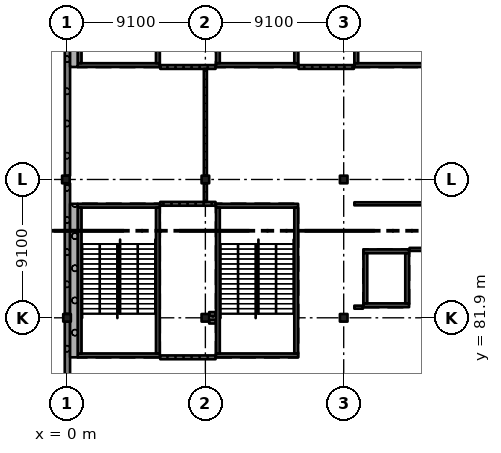
"""IFC4 building model, lengths in metres.
Left out: names, types, materials, properties, quantities, classifications, styles, units other than length and angle.
Written with IfcOpenShell. Run it as: python <this file> out.ifc"""

import sys

from ifc_helpers import new_model, si_unit, direction, frame, frame_2d, origin, origin_2d, place, context, subcontext, project, spatial, rectangle, extrude, element, fill, save


model = new_model("IFC4")
c1 = context("Model", 3, precision=1e-05, world=origin(), true_north=direction((0.0, 1.0)))
c2 = subcontext(c1, "Body", "Model", "MODEL_VIEW")
j1 = project(units=[si_unit("LENGTHUNIT", "METRE"), si_unit("PLANEANGLEUNIT", "RADIAN")], contexts=[c1])
p1 = place(None, origin())
s1 = spatial("IfcSite", under=j1, at=p1, CompositionType="ELEMENT")
p2 = place(p1, origin())
s2 = spatial("IfcBuilding", under=s1, at=p2, CompositionType="ELEMENT")
p3 = place(p2, frame((0.0, 0.0, 24.57)))
s3 = spatial("IfcBuildingStorey", under=s2, at=p3, CompositionType="ELEMENT", Elevation=24.57)
for number, where, z_axis, x_axis in (
    (1, (0.0, 81.9, 0.0), (0.0, 0.0, 1.0), (1.0, 0.0, 0.0)),
    (2, (-0.075, 91.0, 0.0), (0.0, 0.0, 1.0), (1.0, 0.0, 0.0)),
    (3, (9.1, 81.9, 0.0), (0.0, 0.0, 1.0), (1.0, 0.0, 0.0)),
    (4, (9.1, 91.0, 0.0), (0.0, 0.0, 1.0), (1.0, 0.0, 0.0)),
    (5, (18.2, 81.9, 0.0), (0.0, 0.0, 1.0), (1.0, 0.0, 0.0)),
    (6, (18.2, 91.0, 0.0), (0.0, 0.0, 1.0), (1.0, 0.0, 0.0)),
):
    element("IfcColumn", number, at=place(p3, frame(where, z_axis=z_axis, x_axis=x_axis)), inside=s3, PredefinedType="COLUMN", context=c2, shape_type="SweptSolid", body=[
        extrude(rectangle(XDim=0.5, YDim=0.5, at=origin_2d()), origin(), (0.0, 0.0, 1.0), 4.55),
    ])
p4 = place(p3, frame((22.5, 82.725, 0.0), z_axis=(0.0, 0.0, 1.0), x_axis=(-1.0, 0.0, 0.0)))
e7 = element("IfcWall", 7, at=p4, inside=s3, PredefinedType="SHEAR", context=c2, shape_type="SweptSolid", body=[
    extrude(rectangle(XDim=3.0, YDim=0.25, at=frame_2d((1.5, 0.0))), origin(), (0.0, 0.0, 1.0), 4.55),
])
p5 = place(p3, frame((22.5, 86.275, 0.0), z_axis=(0.0, 0.0, 1.0), x_axis=(-1.0, 0.0, 0.0)))
e8 = element("IfcWall", 8, at=p5, inside=s3, PredefinedType="SHEAR", context=c2, shape_type="SweptSolid", body=[
    extrude(rectangle(XDim=3.0, YDim=0.25, at=frame_2d((1.5, 0.0))), origin(), (0.0, 0.0, 1.0), 4.55),
])
p6 = place(p5, frame((0.95, 0.0, 0.0)))
e9 = element("IfcOpeningElement", 9, at=p6, cuts=e8, PredefinedType="OPENING", context=c2, shape_type="SweptSolid", body=[
    extrude(rectangle(XDim=1.1, YDim=2.1, at=frame_2d((0.55, 1.05))), frame((0.0, 0.135, 0.0), z_axis=(0.0, -1.0, 0.0), x_axis=(1.0, 0.0, 0.0)), (0.0, 0.0, 1.0), 0.27),
])
for number, where, z_axis, x_axis in (
    (10, (19.625, 86.15, 0.0), (0.0, 0.0, 1.0), (0.0, -1.0, 0.0)),
    (11, (22.375, 86.15, 0.0), (0.0, 0.0, 1.0), (0.0, -1.0, 0.0)),
):
    element("IfcWall", number, at=place(p3, frame(where, z_axis=z_axis, x_axis=x_axis)), inside=s3, PredefinedType="SHEAR", context=c2, shape_type="SweptSolid", body=[
        extrude(rectangle(XDim=3.3, YDim=0.25, at=frame_2d((1.65, 0.0))), origin(), (0.0, 0.0, 1.0), 4.55),
    ])
p7 = place(p3, frame((6.1, 98.525, 0.0), z_axis=(0.0, 0.0, 1.0), x_axis=(-1.0, 0.0, 0.0)))
e12 = element("IfcWall", 12, at=p7, inside=s3, PredefinedType="SHEAR", context=c2, shape_type="SweptSolid", body=[
    extrude(rectangle(XDim=5.4, YDim=0.25, at=frame_2d((2.7, 0.0))), origin(), (0.0, 0.0, 1.0), 4.55),
])
p8 = place(p7, frame((1.5, 0.0, 0.0)))
e13 = element("IfcOpeningElement", 13, at=p8, cuts=e12, PredefinedType="OPENING", context=c2, shape_type="SweptSolid", body=[
    extrude(rectangle(XDim=2.4, YDim=2.1, at=frame_2d((1.2, 1.05))), frame((0.0, 0.135, 0.0), z_axis=(0.0, -1.0, 0.0), x_axis=(1.0, 0.0, 0.0)), (0.0, 0.0, 1.0), 0.27),
])
for number, where, z_axis, x_axis in (
    (14, (0.825, 108.25, 0.0), (0.0, 0.0, 1.0), (0.0, -1.0, 0.0)),
    (15, (5.975, 108.25, 0.0), (0.0, 0.0, 1.0), (0.0, -1.0, 0.0)),
):
    element("IfcWall", number, at=place(p3, frame(where, z_axis=z_axis, x_axis=x_axis)), inside=s3, PredefinedType="SHEAR", context=c2, shape_type="SweptSolid", body=[
        extrude(rectangle(XDim=9.6, YDim=0.25, at=frame_2d((4.8, 0.0))), origin(), (0.0, 0.0, 1.0), 4.55),
    ])
p9 = place(p3, frame((15.2, 98.525, 0.0), z_axis=(0.0, 0.0, 1.0), x_axis=(-1.0, 0.0, 0.0)))
e16 = element("IfcWall", 16, at=p9, inside=s3, PredefinedType="SHEAR", context=c2, shape_type="SweptSolid", body=[
    extrude(rectangle(XDim=5.4, YDim=0.25, at=frame_2d((2.7, 0.0))), origin(), (0.0, 0.0, 1.0), 4.55),
])
p10 = place(p9, frame((1.5, 0.0, 0.0)))
e17 = element("IfcOpeningElement", 17, at=p10, cuts=e16, PredefinedType="OPENING", context=c2, shape_type="SweptSolid", body=[
    extrude(rectangle(XDim=2.4, YDim=2.1, at=frame_2d((1.2, 1.05))), frame((0.0, 0.135, 0.0), z_axis=(0.0, -1.0, 0.0), x_axis=(1.0, 0.0, 0.0)), (0.0, 0.0, 1.0), 0.27),
])
for number, where, z_axis, x_axis in (
    (18, (9.925, 108.25, 0.0), (0.0, 0.0, 1.0), (0.0, -1.0, 0.0)),
    (19, (15.075, 108.25, 0.0), (0.0, 0.0, 1.0), (0.0, -1.0, 0.0)),
):
    element("IfcWall", number, at=place(p3, frame(where, z_axis=z_axis, x_axis=x_axis)), inside=s3, PredefinedType="SHEAR", context=c2, shape_type="SweptSolid", body=[
        extrude(rectangle(XDim=9.6, YDim=0.25, at=frame_2d((4.8, 0.0))), origin(), (0.0, 0.0, 1.0), 4.55),
    ])
p11 = place(p3, frame((24.3, 98.525, 0.0), z_axis=(0.0, 0.0, 1.0), x_axis=(-1.0, 0.0, 0.0)))
e20 = element("IfcWall", 20, at=p11, inside=s3, PredefinedType="SHEAR", context=c2, shape_type="SweptSolid", body=[
    extrude(rectangle(XDim=5.4, YDim=0.25, at=frame_2d((2.7, 0.0))), origin(), (0.0, 0.0, 1.0), 4.55),
])
p12 = place(p11, frame((1.5, 0.0, 0.0)))
e21 = element("IfcOpeningElement", 21, at=p12, cuts=e20, PredefinedType="OPENING", context=c2, shape_type="SweptSolid", body=[
    extrude(rectangle(XDim=2.4, YDim=2.1, at=frame_2d((1.2, 1.05))), frame((0.0, 0.135, 0.0), z_axis=(0.0, -1.0, 0.0), x_axis=(1.0, 0.0, 0.0)), (0.0, 0.0, 1.0), 0.27),
])
p13 = place(p3, frame((19.025, 108.25, 0.0), z_axis=(0.0, 0.0, 1.0), x_axis=(0.0, -1.0, 0.0)))
e22 = element("IfcWall", 22, at=p13, inside=s3, PredefinedType="SHEAR", context=c2, shape_type="SweptSolid", body=[
    extrude(rectangle(XDim=9.6, YDim=0.25, at=frame_2d((4.8, 0.0))), origin(), (0.0, 0.0, 1.0), 4.55),
])
p14 = place(p3, frame((6.1, 79.425, 0.0), z_axis=(0.0, 0.0, 1.0), x_axis=(-1.0, 0.0, 0.0)))
e23 = element("IfcWall", 23, at=p14, inside=s3, PredefinedType="SHEAR", context=c2, shape_type="SweptSolid", body=[
    extrude(rectangle(XDim=5.4, YDim=0.25, at=frame_2d((2.7, 0.0))), origin(), (0.0, 0.0, 1.0), 4.55),
])
p15 = place(p3, frame((6.1, 89.275, 0.0), z_axis=(0.0, 0.0, 1.0), x_axis=(-1.0, 0.0, 0.0)))
e24 = element("IfcWall", 24, at=p15, inside=s3, PredefinedType="SHEAR", context=c2, shape_type="SweptSolid", body=[
    extrude(rectangle(XDim=5.4, YDim=0.25, at=frame_2d((2.7, 0.0))), origin(), (0.0, 0.0, 1.0), 4.55),
])
p16 = place(p15, frame((1.5, 0.0, 0.0)))
e25 = element("IfcOpeningElement", 25, at=p16, cuts=e24, PredefinedType="OPENING", context=c2, shape_type="SweptSolid", body=[
    extrude(rectangle(XDim=2.4, YDim=2.1, at=frame_2d((1.2, 1.05))), frame((0.0, 0.135, 0.0), z_axis=(0.0, -1.0, 0.0), x_axis=(1.0, 0.0, 0.0)), (0.0, 0.0, 1.0), 0.27),
])
for number, where, z_axis, x_axis in (
    (26, (0.825, 89.15, 0.0), (0.0, 0.0, 1.0), (0.0, -1.0, 0.0)),
    (27, (5.975, 89.15, 0.0), (0.0, 0.0, 1.0), (0.0, -1.0, 0.0)),
):
    element("IfcWall", number, at=place(p3, frame(where, z_axis=z_axis, x_axis=x_axis)), inside=s3, PredefinedType="SHEAR", context=c2, shape_type="SweptSolid", body=[
        extrude(rectangle(XDim=9.6, YDim=0.25, at=frame_2d((4.8, 0.0))), origin(), (0.0, 0.0, 1.0), 4.55),
    ])
p17 = place(p3, frame((15.2, 79.425, 0.0), z_axis=(0.0, 0.0, 1.0), x_axis=(-1.0, 0.0, 0.0)))
e28 = element("IfcWall", 28, at=p17, inside=s3, PredefinedType="SHEAR", context=c2, shape_type="SweptSolid", body=[
    extrude(rectangle(XDim=5.4, YDim=0.25, at=frame_2d((2.7, 0.0))), origin(), (0.0, 0.0, 1.0), 4.55),
])
p18 = place(p3, frame((15.2, 89.275, 0.0), z_axis=(0.0, 0.0, 1.0), x_axis=(-1.0, 0.0, 0.0)))
e29 = element("IfcWall", 29, at=p18, inside=s3, PredefinedType="SHEAR", context=c2, shape_type="SweptSolid", body=[
    extrude(rectangle(XDim=5.4, YDim=0.25, at=frame_2d((2.7, 0.0))), origin(), (0.0, 0.0, 1.0), 4.55),
])
p19 = place(p18, frame((1.5, 0.0, 0.0)))
e30 = element("IfcOpeningElement", 30, at=p19, cuts=e29, PredefinedType="OPENING", context=c2, shape_type="SweptSolid", body=[
    extrude(rectangle(XDim=2.4, YDim=2.1, at=frame_2d((1.2, 1.05))), frame((0.0, 0.135, 0.0), z_axis=(0.0, -1.0, 0.0), x_axis=(1.0, 0.0, 0.0)), (0.0, 0.0, 1.0), 0.27),
])
for number, where, z_axis, x_axis in (
    (31, (9.925, 89.15, 0.0), (0.0, 0.0, 1.0), (0.0, -1.0, 0.0)),
    (32, (15.075, 89.15, 0.0), (0.0, 0.0, 1.0), (0.0, -1.0, 0.0)),
):
    element("IfcWall", number, at=place(p3, frame(where, z_axis=z_axis, x_axis=x_axis)), inside=s3, PredefinedType="SHEAR", context=c2, shape_type="SweptSolid", body=[
        extrude(rectangle(XDim=9.6, YDim=0.25, at=frame_2d((4.8, 0.0))), origin(), (0.0, 0.0, 1.0), 4.55),
    ])
for number, where, z_axis, x_axis in (
    (33, (0.025, 99.85, 0.0), (0.0, 0.0, 1.0), (0.0, -1.0, 0.0)),
    (34, (0.025, 90.75, 0.0), (0.0, 0.0, 1.0), (0.0, -1.0, 0.0)),
):
    element("IfcWall", number, at=place(p3, frame(where, z_axis=z_axis, x_axis=x_axis)), inside=s3, PredefinedType="SOLIDWALL", context=c2, shape_type="SweptSolid", body=[
        extrude(rectangle(XDim=8.6, YDim=0.35, at=frame_2d((4.3, 0.0))), origin(), (0.0, 0.0, 1.0), 3.6),
    ])
p20 = place(p3, frame((0.025, 81.65, 0.0), z_axis=(0.0, 0.0, 1.0), x_axis=(0.0, -1.0, 0.0)))
e35 = element("IfcWall", 35, at=p20, inside=s3, PredefinedType="SOLIDWALL", context=c2, shape_type="SweptSolid", body=[
    extrude(rectangle(XDim=8.6, YDim=0.35, at=frame_2d((4.3, 0.0))), origin(), (0.0, 0.0, 1.0), 3.6),
])
p21 = place(p3, frame((0.45, 98.4, 0.0), z_axis=(0.0, 0.0, 1.0), x_axis=(0.0, 1.0, 0.0)))
e36 = element("IfcWall", 36, at=p21, inside=s3, PredefinedType="SOLIDWALL", context=c2, shape_type="SweptSolid", body=[
    extrude(rectangle(XDim=10.1, YDim=0.5, at=frame_2d((5.05, 0.0))), origin(), (0.0, 0.0, 1.0), 4.35),
])
p22 = place(p3, frame((0.45, 79.3, 0.0), z_axis=(0.0, 0.0, 1.0), x_axis=(0.0, 1.0, 0.0)))
e37 = element("IfcWall", 37, at=p22, inside=s3, PredefinedType="SOLIDWALL", context=c2, shape_type="SweptSolid", body=[
    extrude(rectangle(XDim=10.1, YDim=0.5, at=frame_2d((5.05, 0.0))), origin(), (0.0, 0.0, 1.0), 4.35),
])
p23 = place(p3, frame((6.13, 98.4, 0.0), z_axis=(0.0, 0.0, 1.0), x_axis=(1.0, 0.0, 0.0)))
e38 = element("IfcWall", 38, at=p23, inside=s3, PredefinedType="SOLIDWALL", context=c2, shape_type="SweptSolid", body=[
    extrude(rectangle(XDim=3.64, YDim=0.25, at=frame_2d((1.82, 0.0))), origin(), (0.0, 0.0, 1.0), 4.35),
])
p24 = place(p23, frame((0.95, 0.0, 0.0)))
e39 = element("IfcOpeningElement", 39, at=p24, cuts=e38, PredefinedType="OPENING", context=c2, shape_type="SweptSolid", body=[
    extrude(rectangle(XDim=1.0, YDim=2.1, at=frame_2d((0.5, 1.05))), frame((0.0, 0.135, 0.0), z_axis=(0.0, -1.0, 0.0), x_axis=(1.0, 0.0, 0.0)), (0.0, 0.0, 1.0), 0.27),
])
p25 = place(p3, frame((6.13, 89.4, 0.0), z_axis=(0.0, 0.0, 1.0), x_axis=(1.0, 0.0, 0.0)))
e40 = element("IfcWall", 40, at=p25, inside=s3, PredefinedType="SOLIDWALL", context=c2, shape_type="SweptSolid", body=[
    extrude(rectangle(XDim=3.64, YDim=0.25, at=frame_2d((1.82, 0.0))), origin(), (0.0, 0.0, 1.0), 4.35),
])
p26 = place(p25, frame((1.02, 0.0, 0.0)))
e41 = element("IfcOpeningElement", 41, at=p26, cuts=e40, PredefinedType="OPENING", context=c2, shape_type="SweptSolid", body=[
    extrude(rectangle(XDim=1.0, YDim=2.1, at=frame_2d((0.5, 1.05))), frame((0.0, 0.135, 0.0), z_axis=(0.0, -1.0, 0.0), x_axis=(1.0, 0.0, 0.0)), (0.0, 0.0, 1.0), 0.27),
])
p27 = place(p3, frame((9.1, 90.75, 0.0), z_axis=(0.0, 0.0, 1.0), x_axis=(0.0, -1.0, 0.0)))
e42 = element("IfcWall", 42, at=p27, inside=s3, PredefinedType="PARTITIONING", context=c2, shape_type="SweptSolid", body=[
    extrude(rectangle(XDim=1.225, YDim=0.2, at=frame_2d((0.613, 0.0))), origin(), (0.0, 0.0, 1.0), 3.6),
])
p28 = place(p3, frame((9.1, 98.275, 0.0), z_axis=(0.0, 0.0, 1.0), x_axis=(0.0, -1.0, 0.0)))
e43 = element("IfcWall", 43, at=p28, inside=s3, PredefinedType="PARTITIONING", context=c2, shape_type="SweptSolid", body=[
    extrude(rectangle(XDim=7.025, YDim=0.2, at=frame_2d((3.512, 0.0))), origin(), (0.0, 0.0, 1.0), 3.6),
])
p29 = place(p28, frame((0.85, 0.0, 0.0)))
e44 = element("IfcOpeningElement", 44, at=p29, cuts=e43, PredefinedType="OPENING", context=c2, shape_type="SweptSolid", body=[
    extrude(rectangle(XDim=1.8, YDim=2.4, at=frame_2d((0.9, 1.2))), frame((0.0, 0.11, 0.0), z_axis=(0.0, -1.0, 0.0), x_axis=(1.0, 0.0, 0.0)), (0.0, 0.0, 1.0), 0.22),
])
p30 = place(p28, frame((4.35, 0.0, 0.0)))
e45 = element("IfcOpeningElement", 45, at=p30, cuts=e43, PredefinedType="OPENING", context=c2, shape_type="SweptSolid", body=[
    extrude(rectangle(XDim=1.8, YDim=2.4, at=frame_2d((0.9, 1.2))), frame((0.0, 0.11, 0.0), z_axis=(0.0, -1.0, 0.0), x_axis=(1.0, 0.0, 0.0)), (0.0, 0.0, 1.0), 0.22),
])
p31 = place(p3, frame((9.35, 81.65, 0.0), z_axis=(0.0, 0.0, 1.0), x_axis=(1.0, 0.0, 0.0)))
e46 = element("IfcWall", 46, at=p31, inside=s3, PredefinedType="SOLIDWALL", context=c2, shape_type="SweptSolid", body=[
    extrude(rectangle(XDim=0.42, YDim=0.25, at=frame_2d((0.21, 0.0))), origin(), (0.0, 0.0, 1.0), 4.35),
])
p32 = place(p3, frame((9.77, 79.3, 0.0), z_axis=(0.0, 0.0, 1.0), x_axis=(-1.0, 0.0, 0.0)))
e47 = element("IfcWall", 47, at=p32, inside=s3, PredefinedType="SOLIDWALL", context=c2, shape_type="SweptSolid", body=[
    extrude(rectangle(XDim=3.64, YDim=0.25, at=frame_2d((1.82, 0.0))), origin(), (0.0, 0.0, 1.0), 4.35),
])
p33 = place(p3, frame((9.77, 82.15, 0.0), z_axis=(0.0, 0.0, 1.0), x_axis=(-1.0, 0.0, 0.0)))
e48 = element("IfcWall", 48, at=p33, inside=s3, PredefinedType="SOLIDWALL", context=c2, shape_type="SweptSolid", body=[
    extrude(rectangle(XDim=0.42, YDim=0.25, at=frame_2d((0.21, 0.0))), origin(), (0.0, 0.0, 1.0), 4.35),
])
p34 = place(p3, frame((15.23, 98.4, 0.0), z_axis=(0.0, 0.0, 1.0), x_axis=(1.0, 0.0, 0.0)))
e49 = element("IfcWall", 49, at=p34, inside=s3, PredefinedType="SOLIDWALL", context=c2, shape_type="SweptSolid", body=[
    extrude(rectangle(XDim=3.64, YDim=0.25, at=frame_2d((1.82, 0.0))), origin(), (0.0, 0.0, 1.0), 4.35),
])
p35 = place(p34, frame((1.45, 0.0, 0.0)))
e50 = element("IfcOpeningElement", 50, at=p35, cuts=e49, PredefinedType="OPENING", context=c2, shape_type="SweptSolid", body=[
    extrude(rectangle(XDim=0.8, YDim=2.1, at=frame_2d((0.4, 1.05))), frame((0.0, 0.135, 0.0), z_axis=(0.0, -1.0, 0.0), x_axis=(1.0, 0.0, 0.0)), (0.0, 0.0, 1.0), 0.27),
])
p36 = place(p3, frame((19.47, 82.6, 0.0), z_axis=(0.0, 0.0, 1.0), x_axis=(-1.0, 0.0, 0.0)))
e51 = element("IfcWall", 51, at=p36, inside=s3, PredefinedType="PARTITIONING", context=c2, shape_type="SweptSolid", body=[
    extrude(rectangle(XDim=0.57, YDim=0.2, at=frame_2d((0.285, 0.0))), origin(), (0.0, 0.0, 1.0), 4.35),
])
p37 = place(p3, frame((24.238, 86.4, 0.0), z_axis=(0.0, 0.0, 1.0), x_axis=(-1.0, 0.0, 0.0)))
e52 = element("IfcWall", 52, at=p37, inside=s3, PredefinedType="PARTITIONING", context=c2, shape_type="SweptSolid", body=[
    extrude(rectangle(XDim=1.708, YDim=0.2, at=frame_2d((0.854, 0.0))), origin(), (0.0, 0.0, 1.0), 4.35),
])
p38 = place(p3, frame((24.3, 89.4, 0.0), z_axis=(0.0, 0.0, 1.0), x_axis=(-1.0, 0.0, 0.0)))
e53 = element("IfcWall", 53, at=p38, inside=s3, PredefinedType="PARTITIONING", context=c2, shape_type="SweptSolid", body=[
    extrude(rectangle(XDim=5.4, YDim=0.2, at=frame_2d((2.7, 0.0))), origin(), (0.0, 0.0, 1.0), 4.35),
])
p39 = place(p38, frame((1.85, 0.0, 0.0)))
e54 = element("IfcOpeningElement", 54, at=p39, cuts=e53, PredefinedType="OPENING", context=c2, shape_type="SweptSolid", body=[
    extrude(rectangle(XDim=1.8, YDim=2.4, at=frame_2d((0.9, 1.2))), frame((0.0, 0.11, 0.0), z_axis=(0.0, -1.0, 0.0), x_axis=(1.0, 0.0, 0.0)), (0.0, 0.0, 1.0), 0.22),
])
p40 = place(p26, origin())
e55 = element("IfcDoor", 55, at=p40, inside=s3, OperationType="SINGLE_SWING_RIGHT", PredefinedType="DOOR", context=c2, shape_type="SweptSolid", body=[
    extrude(rectangle(XDim=1.0, YDim=2.1, at=frame_2d((0.5, 1.05))), frame((0.0, 0.025, 0.0), z_axis=(0.0, -1.0, 0.0), x_axis=(1.0, 0.0, 0.0)), (0.0, 0.0, 1.0), 0.05),
])
fill(e41, e55)
p41 = place(p24, origin())
e56 = element("IfcDoor", 56, at=p41, inside=s3, OperationType="SINGLE_SWING_RIGHT", PredefinedType="DOOR", context=c2, shape_type="SweptSolid", body=[
    extrude(rectangle(XDim=1.0, YDim=2.1, at=frame_2d((0.5, 1.05))), frame((0.0, 0.025, 0.0), z_axis=(0.0, -1.0, 0.0), x_axis=(1.0, 0.0, 0.0)), (0.0, 0.0, 1.0), 0.05),
])
fill(e39, e56)
p42 = place(p35, origin())
e57 = element("IfcDoor", 57, at=p42, inside=s3, OperationType="SINGLE_SWING_LEFT", PredefinedType="DOOR", context=c2, shape_type="SweptSolid", body=[
    extrude(rectangle(XDim=0.8, YDim=2.1, at=frame_2d((0.4, 1.05))), frame((0.0, 0.025, 0.0), z_axis=(0.0, -1.0, 0.0), x_axis=(1.0, 0.0, 0.0)), (0.0, 0.0, 1.0), 0.05),
])
fill(e50, e57)
p43 = place(p29, origin())
e58 = element("IfcDoor", 58, at=p43, inside=s3, OperationType="DOUBLE_DOOR_SINGLE_SWING", PredefinedType="DOOR", context=c2, shape_type="SweptSolid", body=[
    extrude(rectangle(XDim=1.8, YDim=2.4, at=frame_2d((0.9, 1.2))), frame((0.0, 0.025, 0.0), z_axis=(0.0, -1.0, 0.0), x_axis=(1.0, 0.0, 0.0)), (0.0, 0.0, 1.0), 0.05),
])
fill(e44, e58)
p44 = place(p30, origin())
e59 = element("IfcDoor", 59, at=p44, inside=s3, OperationType="DOUBLE_DOOR_SINGLE_SWING", PredefinedType="DOOR", context=c2, shape_type="SweptSolid", body=[
    extrude(rectangle(XDim=1.8, YDim=2.4, at=frame_2d((0.9, 1.2))), frame((0.0, 0.025, 0.0), z_axis=(0.0, -1.0, 0.0), x_axis=(1.0, 0.0, 0.0)), (0.0, 0.0, 1.0), 0.05),
])
fill(e45, e59)
p45 = place(p39, origin())
e60 = element("IfcDoor", 60, at=p45, inside=s3, OperationType="DOUBLE_DOOR_SINGLE_SWING", PredefinedType="DOOR", context=c2, shape_type="SweptSolid", body=[
    extrude(rectangle(XDim=1.8, YDim=2.4, at=frame_2d((0.9, 1.2))), frame((0.0, 0.025, 0.0), z_axis=(0.0, -1.0, 0.0), x_axis=(1.0, 0.0, 0.0)), (0.0, 0.0, 1.0), 0.05),
])
fill(e54, e60)
p46 = place(p8, origin())
e61 = element("IfcDoor", 61, at=p46, inside=s3, OperationType="DOUBLE_DOOR_SINGLE_SWING", PredefinedType="DOOR", context=c2, shape_type="SweptSolid", body=[
    extrude(rectangle(XDim=2.4, YDim=2.1, at=frame_2d((1.2, 1.05))), frame((0.0, 0.025, 0.0), z_axis=(0.0, -1.0, 0.0), x_axis=(1.0, 0.0, 0.0)), (0.0, 0.0, 1.0), 0.05),
])
fill(e13, e61)
p47 = place(p10, origin())
e62 = element("IfcDoor", 62, at=p47, inside=s3, OperationType="DOUBLE_DOOR_SINGLE_SWING", PredefinedType="DOOR", context=c2, shape_type="SweptSolid", body=[
    extrude(rectangle(XDim=2.4, YDim=2.1, at=frame_2d((1.2, 1.05))), frame((0.0, 0.025, 0.0), z_axis=(0.0, -1.0, 0.0), x_axis=(1.0, 0.0, 0.0)), (0.0, 0.0, 1.0), 0.05),
])
fill(e17, e62)
p48 = place(p12, origin())
e63 = element("IfcDoor", 63, at=p48, inside=s3, OperationType="DOUBLE_DOOR_SINGLE_SWING", PredefinedType="DOOR", context=c2, shape_type="SweptSolid", body=[
    extrude(rectangle(XDim=2.4, YDim=2.1, at=frame_2d((1.2, 1.05))), frame((0.0, 0.025, 0.0), z_axis=(0.0, -1.0, 0.0), x_axis=(1.0, 0.0, 0.0)), (0.0, 0.0, 1.0), 0.05),
])
fill(e21, e63)
p49 = place(p16, origin())
e64 = element("IfcDoor", 64, at=p49, inside=s3, OperationType="DOUBLE_DOOR_SINGLE_SWING", PredefinedType="DOOR", context=c2, shape_type="SweptSolid", body=[
    extrude(rectangle(XDim=2.4, YDim=2.1, at=frame_2d((1.2, 1.05))), frame((0.0, 0.025, 0.0), z_axis=(0.0, -1.0, 0.0), x_axis=(1.0, 0.0, 0.0)), (0.0, 0.0, 1.0), 0.05),
])
fill(e25, e64)
p50 = place(p19, origin())
e65 = element("IfcDoor", 65, at=p50, inside=s3, OperationType="DOUBLE_DOOR_SINGLE_SWING", PredefinedType="DOOR", context=c2, shape_type="SweptSolid", body=[
    extrude(rectangle(XDim=2.4, YDim=2.1, at=frame_2d((1.2, 1.05))), frame((0.0, 0.025, 0.0), z_axis=(0.0, -1.0, 0.0), x_axis=(1.0, 0.0, 0.0)), (0.0, 0.0, 1.0), 0.05),
])
fill(e30, e65)
p51 = place(p6, origin())
e66 = element("IfcDoor", 66, at=p51, inside=s3, OperationType="DOUBLE_DOOR_SLIDING", PredefinedType="DOOR", context=c2, shape_type="SweptSolid", body=[
    extrude(rectangle(XDim=1.1, YDim=2.1, at=frame_2d((0.55, 1.05))), frame((0.0, 0.025, 0.0), z_axis=(0.0, -1.0, 0.0), x_axis=(1.0, 0.0, 0.0)), (0.0, 0.0, 1.0), 0.05),
])
fill(e9, e66)
save(model, sys.argv[1])
